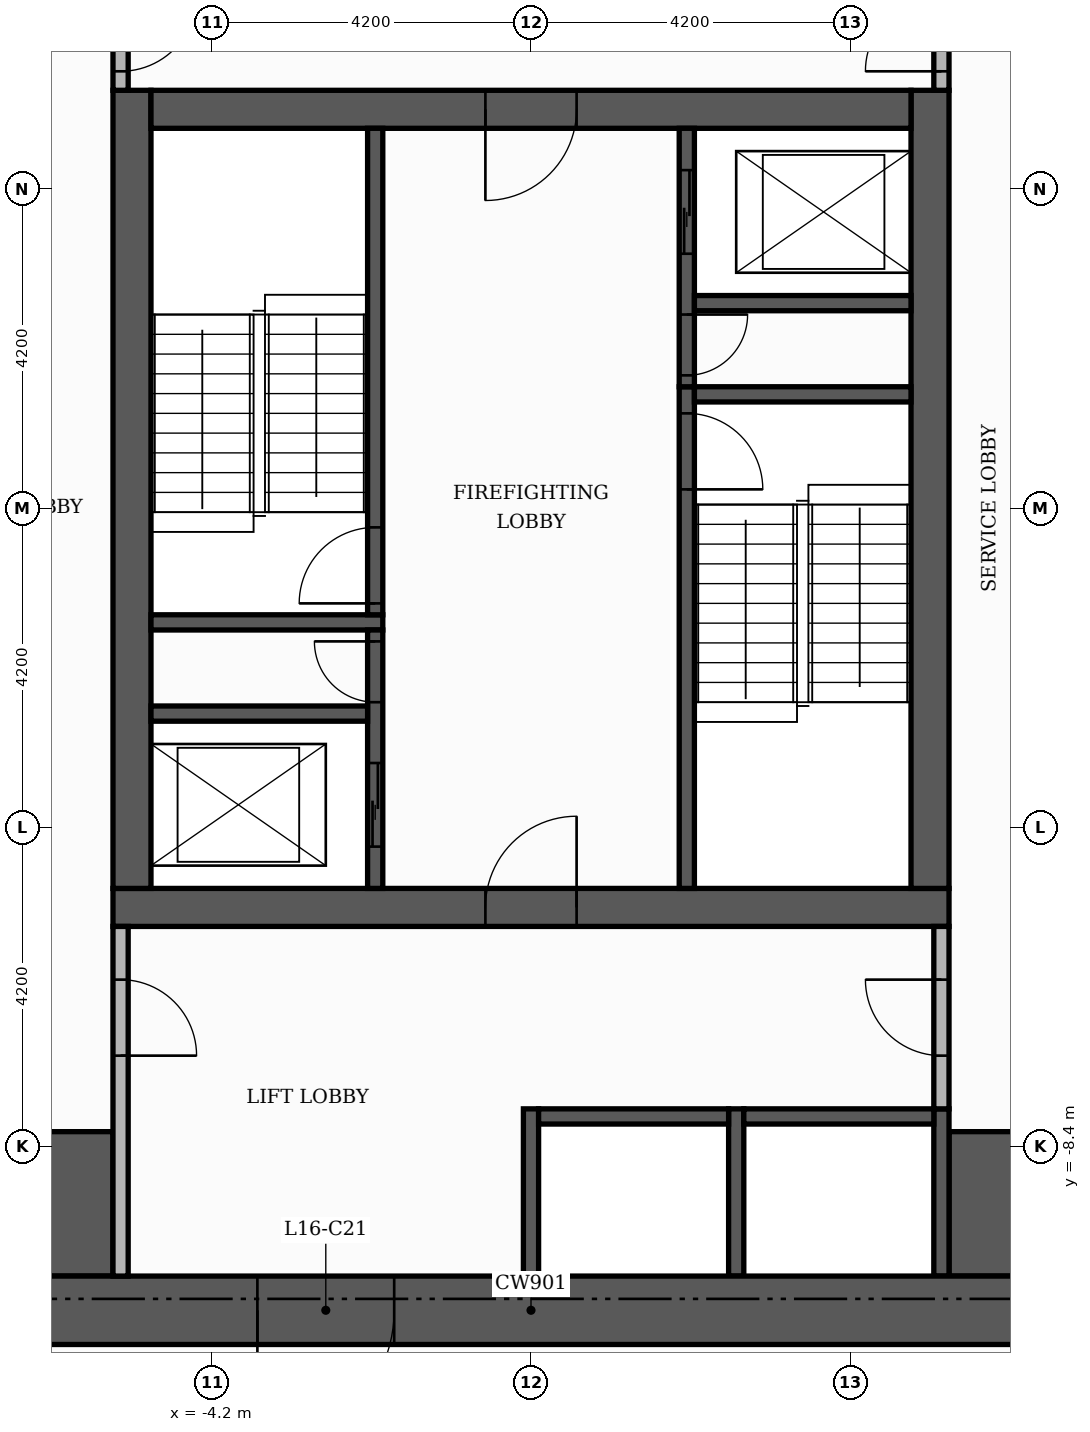
"""IFC4 building model, lengths in metres.
Left out: names, types, materials, properties, quantities, classifications, styles, units other than length and angle.
Written with IfcOpenShell. Run it as: python <this file> out.ifc"""

import sys

from ifc_helpers import new_model, si_unit, direction, frame, frame_2d, origin, place, context, subcontext, project, spatial, rectangle, extrude, element, fill, save


model = new_model("IFC4")
c1 = context("Model", 3, precision=1e-05, world=origin(), true_north=direction((0.0, 1.0)))
c2 = subcontext(c1, "Body", "Model", "MODEL_VIEW")
j1 = project(units=[si_unit("LENGTHUNIT", "METRE"), si_unit("PLANEANGLEUNIT", "RADIAN")], contexts=[c1])
p1 = place(None, origin())
s1 = spatial("IfcSite", under=j1, at=p1, CompositionType="ELEMENT")
p2 = place(p1, origin())
s2 = spatial("IfcBuilding", under=s1, at=p2, CompositionType="ELEMENT")
p3 = place(p2, frame((0.0, 0.0, 69.9)))
s3 = spatial("IfcBuildingStorey", under=s2, at=p3, CompositionType="ELEMENT", Elevation=69.9)
p4 = place(p3, frame((-5.5, -5.25, 0.0), z_axis=(0.0, 0.0, 1.0), x_axis=(1.0, 0.0, 0.0)))
e1 = element("IfcWall", 1, at=p4, inside=s3, PredefinedType="SHEAR", context=c2, shape_type="SweptSolid", body=[
    extrude(rectangle(XDim=11.0, YDim=0.5, at=frame_2d((5.5, 0.0))), origin(), (0.0, 0.0, 1.0), 3.4),
])
p5 = place(p4, frame((4.9, 0.0, 0.0)))
e2 = element("IfcOpeningElement", 2, at=p5, cuts=e1, PredefinedType="OPENING", context=c2, shape_type="SweptSolid", body=[
    extrude(rectangle(XDim=1.2, YDim=2.1, at=frame_2d((0.6, 1.05))), frame((0.0, 0.26, 0.0), z_axis=(0.0, -1.0, 0.0), x_axis=(1.0, 0.0, 0.0)), (0.0, 0.0, 1.0), 0.52),
])
for number, where, z_axis, x_axis in (
    (3, (-5.25, -5.0, 0.0), (0.0, 0.0, 1.0), (0.0, 1.0, 0.0)),
    (4, (5.25, -5.0, 0.0), (0.0, 0.0, 1.0), (0.0, 1.0, 0.0)),
):
    element("IfcWall", number, at=place(p3, frame(where, z_axis=z_axis, x_axis=x_axis)), inside=s3, PredefinedType="SHEAR", context=c2, shape_type="SweptSolid", body=[
        extrude(rectangle(XDim=10.5, YDim=0.5, at=frame_2d((5.25, 0.0))), origin(), (0.0, 0.0, 1.0), 3.4),
    ])
p6 = place(p3, frame((-5.0, 5.25, 0.0), z_axis=(0.0, 0.0, 1.0), x_axis=(1.0, 0.0, 0.0)))
e5 = element("IfcWall", 5, at=p6, inside=s3, PredefinedType="SHEAR", context=c2, shape_type="SweptSolid", body=[
    extrude(rectangle(XDim=10.0, YDim=0.5, at=frame_2d((5.0, 0.0))), origin(), (0.0, 0.0, 1.0), 3.4),
])
p7 = place(p6, frame((4.4, 0.0, 0.0)))
e6 = element("IfcOpeningElement", 6, at=p7, cuts=e5, PredefinedType="OPENING", context=c2, shape_type="SweptSolid", body=[
    extrude(rectangle(XDim=1.2, YDim=2.1, at=frame_2d((0.6, 1.05))), frame((0.0, 0.26, 0.0), z_axis=(0.0, -1.0, 0.0), x_axis=(1.0, 0.0, 0.0)), (0.0, 0.0, 1.0), 0.52),
])
for number, where, z_axis, x_axis in (
    (7, (-10.1, -9.15, 0.0), (0.0, 0.0, 1.0), (1.0, 0.0, 0.0)),
    (8, (5.5, -9.15, 0.0), (0.0, 0.0, 1.0), (1.0, 0.0, 0.0)),
):
    element("IfcWall", number, at=place(p3, frame(where, z_axis=z_axis, x_axis=x_axis)), inside=s3, PredefinedType="SHEAR", context=c2, shape_type="SweptSolid", body=[
        extrude(rectangle(XDim=4.6, YDim=1.9, at=frame_2d((2.3, 0.0))), origin(), (0.0, 0.0, 1.0), 3.4),
    ])
p8 = place(p3, frame((2.05, -5.0, 0.0), z_axis=(0.0, 0.0, 1.0), x_axis=(0.0, 1.0, 0.0)))
e9 = element("IfcWall", 9, at=p8, inside=s3, PredefinedType="SHEAR", context=c2, shape_type="SweptSolid", body=[
    extrude(rectangle(XDim=6.6, YDim=0.2, at=frame_2d((3.3, 0.0))), origin(), (0.0, 0.0, 1.0), 3.4),
])
p9 = place(p8, frame((5.25, 0.0, 0.0)))
e10 = element("IfcOpeningElement", 10, at=p9, cuts=e9, PredefinedType="OPENING", context=c2, shape_type="SweptSolid", body=[
    extrude(rectangle(XDim=1.0, YDim=2.1, at=frame_2d((0.5, 1.05))), frame((0.0, 0.11, 0.0), z_axis=(0.0, -1.0, 0.0), x_axis=(1.0, 0.0, 0.0)), (0.0, 0.0, 1.0), 0.22),
])
p10 = place(p3, frame((-5.0, -1.5, 0.0), z_axis=(0.0, 0.0, 1.0), x_axis=(1.0, 0.0, 0.0)))
e11 = element("IfcWall", 11, at=p10, inside=s3, PredefinedType="SHEAR", context=c2, shape_type="SweptSolid", body=[
    extrude(rectangle(XDim=3.05, YDim=0.2, at=frame_2d((1.525, 0.0))), origin(), (0.0, 0.0, 1.0), 3.4),
])
p11 = place(p3, frame((-2.05, -1.4, 0.0), z_axis=(0.0, 0.0, 1.0), x_axis=(0.0, 1.0, 0.0)))
e12 = element("IfcWall", 12, at=p11, inside=s3, PredefinedType="SHEAR", context=c2, shape_type="SweptSolid", body=[
    extrude(rectangle(XDim=6.4, YDim=0.2, at=frame_2d((3.2, 0.0))), origin(), (0.0, 0.0, 1.0), 3.4),
])
p12 = place(p11, frame((0.15, 0.0, 0.0)))
e13 = element("IfcOpeningElement", 13, at=p12, cuts=e12, PredefinedType="OPENING", context=c2, shape_type="SweptSolid", body=[
    extrude(rectangle(XDim=1.0, YDim=2.1, at=frame_2d((0.5, 1.05))), frame((0.0, 0.11, 0.0), z_axis=(0.0, -1.0, 0.0), x_axis=(1.0, 0.0, 0.0)), (0.0, 0.0, 1.0), 0.22),
])
p13 = place(p3, frame((2.15, 1.5, 0.0), z_axis=(0.0, 0.0, 1.0), x_axis=(1.0, 0.0, 0.0)))
e14 = element("IfcWall", 14, at=p13, inside=s3, PredefinedType="SHEAR", context=c2, shape_type="SweptSolid", body=[
    extrude(rectangle(XDim=2.85, YDim=0.2, at=frame_2d((1.425, 0.0))), origin(), (0.0, 0.0, 1.0), 3.4),
])
for number, where, z_axis, x_axis in (
    (15, (0.0, -10.1, 0.0), (0.0, 0.0, 1.0), (0.0, 1.0, 0.0)),
    (16, (2.7, -10.1, 0.0), (0.0, 0.0, 1.0), (0.0, 1.0, 0.0)),
    (17, (5.4, -10.1, 0.0), (0.0, 0.0, 1.0), (0.0, 1.0, 0.0)),
):
    element("IfcWall", number, at=place(p3, frame(where, z_axis=z_axis, x_axis=x_axis)), inside=s3, PredefinedType="SHEAR", context=c2, shape_type="SweptSolid", body=[
        extrude(rectangle(XDim=2.2, YDim=0.2, at=frame_2d((1.1, 0.0))), origin(), (0.0, 0.0, 1.0), 3.4),
    ])
for number, where, z_axis, x_axis in (
    (18, (0.1, -8.0, 0.0), (0.0, 0.0, 1.0), (1.0, 0.0, 0.0)),
    (19, (2.8, -8.0, 0.0), (0.0, 0.0, 1.0), (1.0, 0.0, 0.0)),
):
    element("IfcWall", number, at=place(p3, frame(where, z_axis=z_axis, x_axis=x_axis)), inside=s3, PredefinedType="SHEAR", context=c2, shape_type="SweptSolid", body=[
        extrude(rectangle(XDim=2.5, YDim=0.2, at=frame_2d((1.25, 0.0))), origin(), (0.0, 0.0, 1.0), 3.4),
    ])
p14 = place(p3, frame((-2.05, -5.0, 0.0), z_axis=(0.0, 0.0, 1.0), x_axis=(0.0, 1.0, 0.0)))
e20 = element("IfcWall", 20, at=p14, inside=s3, PredefinedType="SHEAR", context=c2, shape_type="SweptSolid", body=[
    extrude(rectangle(XDim=3.4, YDim=0.2, at=frame_2d((1.7, 0.0))), origin(), (0.0, 0.0, 1.0), 3.4),
])
p15 = place(p14, frame((0.55, 0.0, 0.0)))
e21 = element("IfcOpeningElement", 21, at=p15, cuts=e20, PredefinedType="OPENING", context=c2, shape_type="SweptSolid", body=[
    extrude(rectangle(XDim=1.1, YDim=2.1, at=frame_2d((0.55, 1.05))), frame((0.0, 0.11, 0.0), z_axis=(0.0, -1.0, 0.0), x_axis=(1.0, 0.0, 0.0)), (0.0, 0.0, 1.0), 0.22),
])
p16 = place(p14, frame((2.45, 0.0, 0.0)))
e22 = element("IfcOpeningElement", 22, at=p16, cuts=e20, PredefinedType="OPENING", context=c2, shape_type="SweptSolid", body=[
    extrude(rectangle(XDim=0.8, YDim=2.1, at=frame_2d((0.4, 1.05))), frame((0.0, 0.11, 0.0), z_axis=(0.0, -1.0, 0.0), x_axis=(1.0, 0.0, 0.0)), (0.0, 0.0, 1.0), 0.22),
])
p17 = place(p3, frame((-5.0, -2.7, 0.0), z_axis=(0.0, 0.0, 1.0), x_axis=(1.0, 0.0, 0.0)))
e23 = element("IfcWall", 23, at=p17, inside=s3, PredefinedType="SHEAR", context=c2, shape_type="SweptSolid", body=[
    extrude(rectangle(XDim=2.85, YDim=0.2, at=frame_2d((1.425, 0.0))), origin(), (0.0, 0.0, 1.0), 3.4),
])
p18 = place(p3, frame((2.05, 1.6, 0.0), z_axis=(0.0, 0.0, 1.0), x_axis=(0.0, 1.0, 0.0)))
e24 = element("IfcWall", 24, at=p18, inside=s3, PredefinedType="SHEAR", context=c2, shape_type="SweptSolid", body=[
    extrude(rectangle(XDim=3.4, YDim=0.2, at=frame_2d((1.7, 0.0))), origin(), (0.0, 0.0, 1.0), 3.4),
])
p19 = place(p18, frame((1.75, 0.0, 0.0)))
e25 = element("IfcOpeningElement", 25, at=p19, cuts=e24, PredefinedType="OPENING", context=c2, shape_type="SweptSolid", body=[
    extrude(rectangle(XDim=1.1, YDim=2.1, at=frame_2d((0.55, 1.05))), frame((0.0, 0.11, 0.0), z_axis=(0.0, -1.0, 0.0), x_axis=(1.0, 0.0, 0.0)), (0.0, 0.0, 1.0), 0.22),
])
p20 = place(p18, frame((0.15, 0.0, 0.0)))
e26 = element("IfcOpeningElement", 26, at=p20, cuts=e24, PredefinedType="OPENING", context=c2, shape_type="SweptSolid", body=[
    extrude(rectangle(XDim=0.8, YDim=2.1, at=frame_2d((0.4, 1.05))), frame((0.0, 0.11, 0.0), z_axis=(0.0, -1.0, 0.0), x_axis=(1.0, 0.0, 0.0)), (0.0, 0.0, 1.0), 0.22),
])
p21 = place(p3, frame((2.15, 2.7, 0.0), z_axis=(0.0, 0.0, 1.0), x_axis=(1.0, 0.0, 0.0)))
e27 = element("IfcWall", 27, at=p21, inside=s3, PredefinedType="SHEAR", context=c2, shape_type="SweptSolid", body=[
    extrude(rectangle(XDim=2.85, YDim=0.2, at=frame_2d((1.425, 0.0))), origin(), (0.0, 0.0, 1.0), 3.4),
])
p22 = place(p3, frame((-11.0, -10.55, 0.0), z_axis=(0.0, 0.0, 1.0), x_axis=(1.0, 0.0, 0.0)))
e28 = element("IfcWall", 28, at=p22, inside=s3, PredefinedType="SHEAR", context=c2, shape_type="SweptSolid", body=[
    extrude(rectangle(XDim=22.0, YDim=0.9, at=frame_2d((11.0, 0.0))), origin(), (0.0, 0.0, 1.0), 3.4),
])
p23 = place(p22, frame((7.4, 0.0, 0.0)))
e29 = element("IfcOpeningElement", 29, at=p23, cuts=e28, PredefinedType="OPENING", context=c2, shape_type="SweptSolid", body=[
    extrude(rectangle(XDim=1.8, YDim=2.2, at=frame_2d((0.9, 1.1))), frame((0.0, 0.46, 0.0), z_axis=(0.0, -1.0, 0.0), x_axis=(1.0, 0.0, 0.0)), (0.0, 0.0, 1.0), 0.92),
])
p24 = place(p3, frame((-5.4, -10.1, 0.0), z_axis=(0.0, 0.0, 1.0), x_axis=(0.0, 1.0, 0.0)))
e30 = element("IfcWall", 30, at=p24, inside=s3, PredefinedType="PARTITIONING", context=c2, shape_type="SweptSolid", body=[
    extrude(rectangle(XDim=4.6, YDim=0.2, at=frame_2d((2.3, 0.0))), origin(), (0.0, 0.0, 1.0), 3.4),
])
p25 = place(p24, frame((2.9, 0.0, 0.0)))
e31 = element("IfcOpeningElement", 31, at=p25, cuts=e30, PredefinedType="OPENING", context=c2, shape_type="SweptSolid", body=[
    extrude(rectangle(XDim=1.0, YDim=2.1, at=frame_2d((0.5, 1.05))), frame((0.0, 0.11, 0.0), z_axis=(0.0, -1.0, 0.0), x_axis=(1.0, 0.0, 0.0)), (0.0, 0.0, 1.0), 0.22),
])
p26 = place(p3, frame((5.4, -7.9, 0.0), z_axis=(0.0, 0.0, 1.0), x_axis=(0.0, 1.0, 0.0)))
e32 = element("IfcWall", 32, at=p26, inside=s3, PredefinedType="PARTITIONING", context=c2, shape_type="SweptSolid", body=[
    extrude(rectangle(XDim=2.4, YDim=0.2, at=frame_2d((1.2, 0.0))), origin(), (0.0, 0.0, 1.0), 3.4),
])
p27 = place(p26, frame((0.7, 0.0, 0.0)))
e33 = element("IfcOpeningElement", 33, at=p27, cuts=e32, PredefinedType="OPENING", context=c2, shape_type="SweptSolid", body=[
    extrude(rectangle(XDim=1.0, YDim=2.1, at=frame_2d((0.5, 1.05))), frame((0.0, 0.11, 0.0), z_axis=(0.0, -1.0, 0.0), x_axis=(1.0, 0.0, 0.0)), (0.0, 0.0, 1.0), 0.22),
])
p28 = place(p3, frame((-5.4, 5.5, 0.0), z_axis=(0.0, 0.0, 1.0), x_axis=(0.0, 1.0, 0.0)))
e34 = element("IfcWall", 34, at=p28, inside=s3, PredefinedType="PARTITIONING", context=c2, shape_type="SweptSolid", body=[
    extrude(rectangle(XDim=1.55, YDim=0.2, at=frame_2d((0.775, 0.0))), origin(), (0.0, 0.0, 1.0), 3.4),
])
p29 = place(p28, frame((0.25, 0.0, 0.0)))
e35 = element("IfcOpeningElement", 35, at=p29, cuts=e34, PredefinedType="OPENING", context=c2, shape_type="SweptSolid", body=[
    extrude(rectangle(XDim=1.0, YDim=2.1, at=frame_2d((0.5, 1.05))), frame((0.0, 0.11, 0.0), z_axis=(0.0, -1.0, 0.0), x_axis=(1.0, 0.0, 0.0)), (0.0, 0.0, 1.0), 0.22),
])
p30 = place(p3, frame((5.4, 5.5, 0.0), z_axis=(0.0, 0.0, 1.0), x_axis=(0.0, 1.0, 0.0)))
e36 = element("IfcWall", 36, at=p30, inside=s3, PredefinedType="PARTITIONING", context=c2, shape_type="SweptSolid", body=[
    extrude(rectangle(XDim=4.6, YDim=0.2, at=frame_2d((2.3, 0.0))), origin(), (0.0, 0.0, 1.0), 3.4),
])
p31 = place(p30, frame((0.25, 0.0, 0.0)))
e37 = element("IfcOpeningElement", 37, at=p31, cuts=e36, PredefinedType="OPENING", context=c2, shape_type="SweptSolid", body=[
    extrude(rectangle(XDim=1.0, YDim=2.1, at=frame_2d((0.5, 1.05))), frame((0.0, 0.11, 0.0), z_axis=(0.0, -1.0, 0.0), x_axis=(1.0, 0.0, 0.0)), (0.0, 0.0, 1.0), 0.22),
])
p32 = place(p19, origin())
e38 = element("IfcDoor", 38, at=p32, inside=s3, OperationType="SLIDING_TO_LEFT", PredefinedType="DOOR", context=c2, shape_type="SweptSolid", body=[
    extrude(rectangle(XDim=1.1, YDim=2.1, at=frame_2d((0.55, 1.05))), frame((0.0, 0.025, 0.0), z_axis=(0.0, -1.0, 0.0), x_axis=(1.0, 0.0, 0.0)), (0.0, 0.0, 1.0), 0.05),
])
fill(e25, e38)
p33 = place(p15, origin())
e39 = element("IfcDoor", 39, at=p33, inside=s3, OperationType="SLIDING_TO_LEFT", PredefinedType="DOOR", context=c2, shape_type="SweptSolid", body=[
    extrude(rectangle(XDim=1.1, YDim=2.1, at=frame_2d((0.55, 1.05))), frame((0.0, 0.025, 0.0), z_axis=(0.0, -1.0, 0.0), x_axis=(1.0, 0.0, 0.0)), (0.0, 0.0, 1.0), 0.05),
])
fill(e21, e39)
p34 = place(p12, origin())
e40 = element("IfcDoor", 40, at=p34, inside=s3, OperationType="SINGLE_SWING_LEFT", PredefinedType="DOOR", context=c2, shape_type="SweptSolid", body=[
    extrude(rectangle(XDim=1.0, YDim=2.1, at=frame_2d((0.5, 1.05))), frame((0.0, 0.025, 0.0), z_axis=(0.0, -1.0, 0.0), x_axis=(1.0, 0.0, 0.0)), (0.0, 0.0, 1.0), 0.05),
])
fill(e13, e40)
p35 = place(p9, frame((1.0, 0.0, 0.0), z_axis=(0.0, 0.0, 1.0), x_axis=(-1.0, 0.0, 0.0)))
e41 = element("IfcDoor", 41, at=p35, inside=s3, OperationType="SINGLE_SWING_LEFT", PredefinedType="DOOR", context=c2, shape_type="SweptSolid", body=[
    extrude(rectangle(XDim=1.0, YDim=2.1, at=frame_2d((0.5, 1.05))), frame((0.0, 0.025, 0.0), z_axis=(0.0, -1.0, 0.0), x_axis=(1.0, 0.0, 0.0)), (0.0, 0.0, 1.0), 0.05),
])
fill(e10, e41)
p36 = place(p20, frame((0.8, 0.0, 0.0), z_axis=(0.0, 0.0, 1.0), x_axis=(-1.0, 0.0, 0.0)))
e42 = element("IfcDoor", 42, at=p36, inside=s3, OperationType="SINGLE_SWING_RIGHT", PredefinedType="DOOR", context=c2, shape_type="SweptSolid", body=[
    extrude(rectangle(XDim=0.8, YDim=2.1, at=frame_2d((0.4, 1.05))), frame((0.0, 0.025, 0.0), z_axis=(0.0, -1.0, 0.0), x_axis=(1.0, 0.0, 0.0)), (0.0, 0.0, 1.0), 0.05),
])
fill(e26, e42)
p37 = place(p16, origin())
e43 = element("IfcDoor", 43, at=p37, inside=s3, OperationType="SINGLE_SWING_RIGHT", PredefinedType="DOOR", context=c2, shape_type="SweptSolid", body=[
    extrude(rectangle(XDim=0.8, YDim=2.1, at=frame_2d((0.4, 1.05))), frame((0.0, 0.025, 0.0), z_axis=(0.0, -1.0, 0.0), x_axis=(1.0, 0.0, 0.0)), (0.0, 0.0, 1.0), 0.05),
])
fill(e22, e43)
p38 = place(p7, frame((1.2, 0.0, 0.0), z_axis=(0.0, 0.0, 1.0), x_axis=(-1.0, 0.0, 0.0)))
e44 = element("IfcDoor", 44, at=p38, inside=s3, OperationType="SINGLE_SWING_LEFT", PredefinedType="DOOR", context=c2, shape_type="SweptSolid", body=[
    extrude(rectangle(XDim=1.2, YDim=2.1, at=frame_2d((0.6, 1.05))), frame((0.0, 0.025, 0.0), z_axis=(0.0, -1.0, 0.0), x_axis=(1.0, 0.0, 0.0)), (0.0, 0.0, 1.0), 0.05),
])
fill(e6, e44)
p39 = place(p5, origin())
e45 = element("IfcDoor", 45, at=p39, inside=s3, OperationType="SINGLE_SWING_RIGHT", PredefinedType="DOOR", context=c2, shape_type="SweptSolid", body=[
    extrude(rectangle(XDim=1.2, YDim=2.1, at=frame_2d((0.6, 1.05))), frame((0.0, 0.025, 0.0), z_axis=(0.0, -1.0, 0.0), x_axis=(1.0, 0.0, 0.0)), (0.0, 0.0, 1.0), 0.05),
])
fill(e2, e45)
p40 = place(p29, frame((1.0, 0.0, 0.0), z_axis=(0.0, 0.0, 1.0), x_axis=(-1.0, 0.0, 0.0)))
e46 = element("IfcDoor", 46, at=p40, inside=s3, OperationType="SINGLE_SWING_RIGHT", PredefinedType="DOOR", context=c2, shape_type="SweptSolid", body=[
    extrude(rectangle(XDim=1.0, YDim=2.1, at=frame_2d((0.5, 1.05))), frame((0.0, 0.025, 0.0), z_axis=(0.0, -1.0, 0.0), x_axis=(1.0, 0.0, 0.0)), (0.0, 0.0, 1.0), 0.05),
])
fill(e35, e46)
p41 = place(p31, origin())
e47 = element("IfcDoor", 47, at=p41, inside=s3, OperationType="SINGLE_SWING_LEFT", PredefinedType="DOOR", context=c2, shape_type="SweptSolid", body=[
    extrude(rectangle(XDim=1.0, YDim=2.1, at=frame_2d((0.5, 1.05))), frame((0.0, 0.025, 0.0), z_axis=(0.0, -1.0, 0.0), x_axis=(1.0, 0.0, 0.0)), (0.0, 0.0, 1.0), 0.05),
])
fill(e37, e47)
p42 = place(p25, frame((1.0, 0.0, 0.0), z_axis=(0.0, 0.0, 1.0), x_axis=(-1.0, 0.0, 0.0)))
e48 = element("IfcDoor", 48, at=p42, inside=s3, OperationType="SINGLE_SWING_LEFT", PredefinedType="DOOR", context=c2, shape_type="SweptSolid", body=[
    extrude(rectangle(XDim=1.0, YDim=2.1, at=frame_2d((0.5, 1.05))), frame((0.0, 0.025, 0.0), z_axis=(0.0, -1.0, 0.0), x_axis=(1.0, 0.0, 0.0)), (0.0, 0.0, 1.0), 0.05),
])
fill(e31, e48)
p43 = place(p27, origin())
e49 = element("IfcDoor", 49, at=p43, inside=s3, OperationType="SINGLE_SWING_RIGHT", PredefinedType="DOOR", context=c2, shape_type="SweptSolid", body=[
    extrude(rectangle(XDim=1.0, YDim=2.1, at=frame_2d((0.5, 1.05))), frame((0.0, 0.025, 0.0), z_axis=(0.0, -1.0, 0.0), x_axis=(1.0, 0.0, 0.0)), (0.0, 0.0, 1.0), 0.05),
])
fill(e33, e49)
p44 = place(p23, frame((1.8, 0.0, 0.0), z_axis=(0.0, 0.0, 1.0), x_axis=(-1.0, 0.0, 0.0)))
e50 = element("IfcDoor", 50, at=p44, inside=s3, OperationType="DOUBLE_DOOR_SINGLE_SWING", PredefinedType="DOOR", context=c2, shape_type="SweptSolid", body=[
    extrude(rectangle(XDim=1.8, YDim=2.2, at=frame_2d((0.9, 1.1))), frame((0.0, 0.025, 0.0), z_axis=(0.0, -1.0, 0.0), x_axis=(1.0, 0.0, 0.0)), (0.0, 0.0, 1.0), 0.05),
])
fill(e29, e50)
save(model, sys.argv[1])
